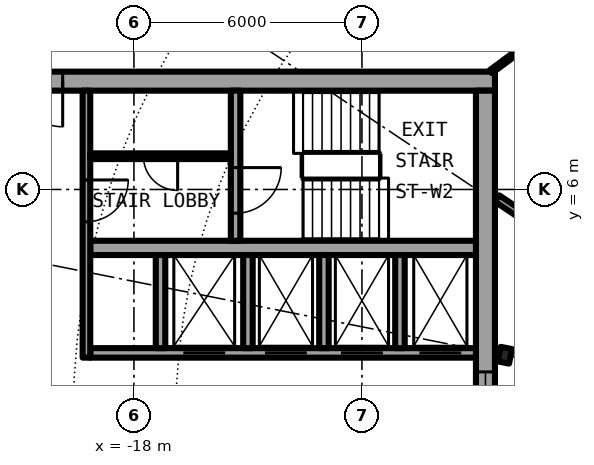
"""IFC4 building model, lengths in metres.
Left out: names, types, materials, properties, quantities, classifications, styles, units other than length and angle.
Written with IfcOpenShell. Run it as: python <this file> out.ifc"""

import sys

from ifc_helpers import new_model, si_unit, direction, frame, frame_2d, origin, origin_2d, place, context, subcontext, project, spatial, rectangle, i_section, extrude, element, fill, save


model = new_model("IFC4")
c1 = context("Model", 3, precision=1e-05, world=origin(), true_north=direction((0.0, 1.0)))
c2 = subcontext(c1, "Body", "Model", "MODEL_VIEW")
j1 = project(units=[si_unit("LENGTHUNIT", "METRE"), si_unit("PLANEANGLEUNIT", "RADIAN")], contexts=[c1])
p1 = place(None, origin())
s1 = spatial("IfcSite", under=j1, at=p1, CompositionType="ELEMENT")
p2 = place(p1, origin())
s2 = spatial("IfcBuilding", under=s1, at=p2, CompositionType="ELEMENT")
p3 = place(p2, frame((0.0, 0.0, 154.35)))
s3 = spatial("IfcBuildingStorey", under=s2, at=p3, CompositionType="ELEMENT", Elevation=154.35)
p4 = place(p3, frame((-8.239, 1.639, 0.0), z_axis=(0.0, 0.0, 1.0), x_axis=(-0.980785280403, 0.195090322016, 0.0)))
e1 = element("IfcColumn", 1, at=p4, inside=s3, PredefinedType="COLUMN", context=c2, shape_type="SweptSolid", body=[
    extrude(i_section(OverallWidth=0.3, OverallDepth=0.39, WebThickness=0.011, FlangeThickness=0.019, FilletRadius=0.027, at=origin_2d()), origin(), (0.0, 0.0, 1.0), 3.05),
])
p5 = place(p3, frame((-8.5, 8.85, 0.0), z_axis=(0.0, 0.0, 1.0), x_axis=(-1.0, 0.0, 0.0)))
e2 = element("IfcWall", 2, at=p5, inside=s3, PredefinedType="SHEAR", context=c2, shape_type="SweptSolid", body=[
    extrude(rectangle(XDim=13.6, YDim=0.5, at=frame_2d((6.8, 0.0))), origin(), (0.0, 0.0, 1.0), 3.05),
])
p6 = place(p5, frame((11.375, 0.0, 0.0)))
e3 = element("IfcOpeningElement", 3, at=p6, cuts=e2, PredefinedType="OPENING", context=c2, shape_type="SweptSolid", body=[
    extrude(rectangle(XDim=1.2, YDim=2.3, at=frame_2d((0.6, 1.15))), frame((0.0, 0.26, 0.0), z_axis=(0.0, -1.0, 0.0), x_axis=(1.0, 0.0, 0.0)), (0.0, 0.0, 1.0), 0.52),
])
p7 = place(p3, frame((-8.75, 8.6, 0.0), z_axis=(0.0, 0.0, 1.0), x_axis=(0.0, -1.0, 0.0)))
e4 = element("IfcWall", 4, at=p7, inside=s3, PredefinedType="SHEAR", context=c2, shape_type="SweptSolid", body=[
    extrude(rectangle(XDim=17.2, YDim=0.5, at=frame_2d((8.6, 0.0))), origin(), (0.0, 0.0, 1.0), 3.05),
])
p8 = place(p7, frame((7.4, 0.0, 0.1)))
e5 = element("IfcOpeningElement", 5, at=p8, cuts=e4, PredefinedType="OPENING", context=c2, shape_type="SweptSolid", body=[
    extrude(rectangle(XDim=2.4, YDim=2.2, at=frame_2d((1.2, 1.1))), frame((0.0, 0.26, 0.0), z_axis=(0.0, -1.0, 0.0), x_axis=(1.0, 0.0, 0.0)), (0.0, 0.0, 1.0), 0.52),
])
p9 = place(p3, frame((-9.0, 1.7, 0.0), z_axis=(0.0, 0.0, 1.0), x_axis=(-1.0, 0.0, 0.0)))
e6 = element("IfcWall", 6, at=p9, inside=s3, PredefinedType="SHEAR", context=c2, shape_type="SweptSolid", body=[
    extrude(rectangle(XDim=10.15, YDim=0.25, at=frame_2d((5.075, 0.0))), origin(), (0.0, 0.0, 1.0), 3.05),
])
p10 = place(p9, frame((0.387, 0.0, 0.0)))
e7 = element("IfcOpeningElement", 7, at=p10, cuts=e6, PredefinedType="OPENING", context=c2, shape_type="SweptSolid", body=[
    extrude(rectangle(XDim=1.1, YDim=2.3, at=frame_2d((0.55, 1.15))), frame((0.0, 0.135, 0.0), z_axis=(0.0, -1.0, 0.0), x_axis=(1.0, 0.0, 0.0)), (0.0, 0.0, 1.0), 0.27),
])
p11 = place(p9, frame((2.45, 0.0, 0.0)))
e8 = element("IfcOpeningElement", 8, at=p11, cuts=e6, PredefinedType="OPENING", context=c2, shape_type="SweptSolid", body=[
    extrude(rectangle(XDim=1.1, YDim=2.3, at=frame_2d((0.55, 1.15))), frame((0.0, 0.135, 0.0), z_axis=(0.0, -1.0, 0.0), x_axis=(1.0, 0.0, 0.0)), (0.0, 0.0, 1.0), 0.27),
])
p12 = place(p9, frame((4.45, 0.0, 0.0)))
e9 = element("IfcOpeningElement", 9, at=p12, cuts=e6, PredefinedType="OPENING", context=c2, shape_type="SweptSolid", body=[
    extrude(rectangle(XDim=1.1, YDim=2.3, at=frame_2d((0.55, 1.15))), frame((0.0, 0.135, 0.0), z_axis=(0.0, -1.0, 0.0), x_axis=(1.0, 0.0, 0.0)), (0.0, 0.0, 1.0), 0.27),
])
p13 = place(p9, frame((6.6, 0.0, 0.0)))
e10 = element("IfcOpeningElement", 10, at=p13, cuts=e6, PredefinedType="OPENING", context=c2, shape_type="SweptSolid", body=[
    extrude(rectangle(XDim=1.1, YDim=2.3, at=frame_2d((0.55, 1.15))), frame((0.0, 0.135, 0.0), z_axis=(0.0, -1.0, 0.0), x_axis=(1.0, 0.0, 0.0)), (0.0, 0.0, 1.0), 0.27),
])
p14 = place(p3, frame((-9.0, 4.462, 0.0), z_axis=(0.0, 0.0, 1.0), x_axis=(-1.0, 0.0, 0.0)))
e11 = element("IfcWall", 11, at=p14, inside=s3, PredefinedType="SHEAR", context=c2, shape_type="SweptSolid", body=[
    extrude(rectangle(XDim=10.15, YDim=0.375, at=frame_2d((5.075, 0.0))), origin(), (0.0, 0.0, 1.0), 3.05),
])
p15 = place(p3, frame((-15.325, 8.6, 0.0), z_axis=(0.0, 0.0, 1.0), x_axis=(0.0, -1.0, 0.0)))
e12 = element("IfcWall", 12, at=p15, inside=s3, PredefinedType="SHEAR", context=c2, shape_type="SweptSolid", body=[
    extrude(rectangle(XDim=3.95, YDim=0.25, at=frame_2d((1.975, 0.0))), origin(), (0.0, 0.0, 1.0), 3.05),
])
p16 = place(p15, frame((2.025, 0.0, 0.0)))
e13 = element("IfcOpeningElement", 13, at=p16, cuts=e12, PredefinedType="OPENING", context=c2, shape_type="SweptSolid", body=[
    extrude(rectangle(XDim=1.2, YDim=2.3, at=frame_2d((0.6, 1.15))), frame((0.0, 0.135, 0.0), z_axis=(0.0, -1.0, 0.0), x_axis=(1.0, 0.0, 0.0)), (0.0, 0.0, 1.0), 0.27),
])
for number, where, z_axis, x_axis in (
    (14, (-15.0, 1.825, 0.0), (0.0, 0.0, 1.0), (0.0, 1.0, 0.0)),
    (15, (-17.3, 1.825, 0.0), (0.0, 0.0, 1.0), (0.0, 1.0, 0.0)),
):
    element("IfcWall", number, at=place(p3, frame(where, z_axis=z_axis, x_axis=x_axis)), inside=s3, PredefinedType="SOLIDWALL", context=c2, shape_type="SweptSolid", body=[
        extrude(rectangle(XDim=2.45, YDim=0.25, at=frame_2d((1.225, 0.0))), origin(), (0.0, 0.0, 1.0), 2.7),
    ])
p17 = place(p3, frame((-19.25, 8.6, 0.0), z_axis=(0.0, 0.0, 1.0), x_axis=(0.0, -1.0, 0.0)))
e16 = element("IfcWall", 16, at=p17, inside=s3, PredefinedType="SOLIDWALL", context=c2, shape_type="SweptSolid", body=[
    extrude(rectangle(XDim=7.025, YDim=0.2, at=frame_2d((3.513, 0.0))), origin(), (0.0, 0.0, 1.0), 2.7),
])
p18 = place(p17, frame((2.35, 0.0, 0.0)))
e17 = element("IfcOpeningElement", 17, at=p18, cuts=e16, PredefinedType="OPENING", context=c2, shape_type="SweptSolid", body=[
    extrude(rectangle(XDim=1.1, YDim=2.3, at=frame_2d((0.55, 1.15))), frame((0.0, 0.11, 0.0), z_axis=(0.0, -1.0, 0.0), x_axis=(1.0, 0.0, 0.0)), (0.0, 0.0, 1.0), 0.22),
])
for number, where, z_axis, x_axis in (
    (18, (-11.0, 1.825, 0.0), (0.0, 0.0, 1.0), (0.0, 1.0, 0.0)),
    (19, (-13.0, 1.825, 0.0), (0.0, 0.0, 1.0), (0.0, 1.0, 0.0)),
):
    element("IfcWall", number, at=place(p3, frame(where, z_axis=z_axis, x_axis=x_axis)), inside=s3, PredefinedType="SOLIDWALL", context=c2, shape_type="SweptSolid", body=[
        extrude(rectangle(XDim=2.45, YDim=0.25, at=frame_2d((1.225, 0.0))), origin(), (0.0, 0.0, 1.0), 2.7),
    ])
p19 = place(p3, frame((-15.45, 6.875, 0.0), z_axis=(0.0, 0.0, 1.0), x_axis=(-1.0, 0.0, 0.0)))
e20 = element("IfcWall", 20, at=p19, inside=s3, PredefinedType="PARTITIONING", context=c2, shape_type="SweptSolid", body=[
    extrude(rectangle(XDim=3.7, YDim=0.15, at=frame_2d((1.85, 0.0))), origin(), (0.0, 0.0, 1.0), 2.7),
])
p20 = place(p19, frame((1.4, 0.0, 0.0)))
e21 = element("IfcOpeningElement", 21, at=p20, cuts=e20, PredefinedType="OPENING", context=c2, shape_type="SweptSolid", body=[
    extrude(rectangle(XDim=0.9, YDim=2.3, at=frame_2d((0.45, 1.15))), frame((0.0, 0.085, 0.0), z_axis=(0.0, -1.0, 0.0), x_axis=(1.0, 0.0, 0.0)), (0.0, 0.0, 1.0), 0.17),
])
p21 = place(p3, frame((-10.616, 12.875, 0.0), z_axis=(0.0, 0.0, 1.0), x_axis=(0.636045954217, -0.771651180342, 0.0)))
e22 = element("IfcWall", 22, at=p21, inside=s3, PredefinedType="PARTITIONING", context=c2, shape_type="SweptSolid", body=[
    extrude(rectangle(XDim=8.968, YDim=0.1, at=frame_2d((4.484, 0.0))), origin(), (0.0, 0.0, 1.0), 2.7),
])
p22 = place(p21, frame((1.667, 0.0, 0.0)))
e23 = element("IfcOpeningElement", 23, at=p22, cuts=e22, PredefinedType="OPENING", context=c2, shape_type="SweptSolid", body=[
    extrude(rectangle(XDim=0.9, YDim=2.3, at=frame_2d((0.45, 1.15))), frame((0.0, 0.06, 0.0), z_axis=(0.0, -1.0, 0.0), x_axis=(1.0, 0.0, 0.0)), (0.0, 0.0, 1.0), 0.12),
])
p23 = place(p21, frame((6.151, 0.0, 0.0)))
e24 = element("IfcOpeningElement", 24, at=p23, cuts=e22, PredefinedType="OPENING", context=c2, shape_type="SweptSolid", body=[
    extrude(rectangle(XDim=0.9, YDim=2.3, at=frame_2d((0.45, 1.15))), frame((0.0, 0.06, 0.0), z_axis=(0.0, -1.0, 0.0), x_axis=(1.0, 0.0, 0.0)), (0.0, 0.0, 1.0), 0.12),
])
p24 = place(p3, frame((-6.513, 4.472, 0.0), z_axis=(0.0, 0.0, 1.0), x_axis=(-0.83133816625, 0.555766905579, 0.0)))
e25 = element("IfcWall", 25, at=p24, inside=s3, PredefinedType="PARTITIONING", context=c2, shape_type="SweptSolid", body=[
    extrude(rectangle(XDim=2.323, YDim=0.2, at=frame_2d((1.162, 0.0))), origin(), (0.0, 0.0, 1.0), 2.7),
])
p25 = place(p3, frame((-8.607, 9.1, 0.0), z_axis=(0.0, 0.0, 1.0), x_axis=(0.803199066515, 0.595710718007, 0.0)))
e26 = element("IfcWall", 26, at=p25, inside=s3, PredefinedType="PARTITIONING", context=c2, shape_type="SweptSolid", body=[
    extrude(rectangle(XDim=0.858, YDim=0.1, at=frame_2d((0.429, 0.0))), origin(), (0.0, 0.0, 1.0), 2.7),
])
p26 = place(p10, origin())
e27 = element("IfcDoor", 27, at=p26, inside=s3, OperationType="DOUBLE_DOOR_SLIDING", PredefinedType="DOOR", context=c2, shape_type="SweptSolid", body=[
    extrude(rectangle(XDim=1.1, YDim=2.3, at=frame_2d((0.55, 1.15))), frame((0.0, 0.025, 0.0), z_axis=(0.0, -1.0, 0.0), x_axis=(1.0, 0.0, 0.0)), (0.0, 0.0, 1.0), 0.05),
])
fill(e7, e27)
p27 = place(p11, origin())
e28 = element("IfcDoor", 28, at=p27, inside=s3, OperationType="DOUBLE_DOOR_SLIDING", PredefinedType="DOOR", context=c2, shape_type="SweptSolid", body=[
    extrude(rectangle(XDim=1.1, YDim=2.3, at=frame_2d((0.55, 1.15))), frame((0.0, 0.025, 0.0), z_axis=(0.0, -1.0, 0.0), x_axis=(1.0, 0.0, 0.0)), (0.0, 0.0, 1.0), 0.05),
])
fill(e8, e28)
p28 = place(p12, origin())
e29 = element("IfcDoor", 29, at=p28, inside=s3, OperationType="DOUBLE_DOOR_SLIDING", PredefinedType="DOOR", context=c2, shape_type="SweptSolid", body=[
    extrude(rectangle(XDim=1.1, YDim=2.3, at=frame_2d((0.55, 1.15))), frame((0.0, 0.025, 0.0), z_axis=(0.0, -1.0, 0.0), x_axis=(1.0, 0.0, 0.0)), (0.0, 0.0, 1.0), 0.05),
])
fill(e9, e29)
p29 = place(p13, origin())
e30 = element("IfcDoor", 30, at=p29, inside=s3, OperationType="DOUBLE_DOOR_SLIDING", PredefinedType="DOOR", context=c2, shape_type="SweptSolid", body=[
    extrude(rectangle(XDim=1.1, YDim=2.3, at=frame_2d((0.55, 1.15))), frame((0.0, 0.025, 0.0), z_axis=(0.0, -1.0, 0.0), x_axis=(1.0, 0.0, 0.0)), (0.0, 0.0, 1.0), 0.05),
])
fill(e10, e30)
p30 = place(p20, origin())
e31 = element("IfcDoor", 31, at=p30, inside=s3, OperationType="SINGLE_SWING_LEFT", PredefinedType="DOOR", context=c2, shape_type="SweptSolid", body=[
    extrude(rectangle(XDim=0.9, YDim=2.3, at=frame_2d((0.45, 1.15))), frame((0.0, 0.025, 0.0), z_axis=(0.0, -1.0, 0.0), x_axis=(1.0, 0.0, 0.0)), (0.0, 0.0, 1.0), 0.05),
])
fill(e21, e31)
p31 = place(p16, origin())
e32 = element("IfcDoor", 32, at=p31, inside=s3, OperationType="SINGLE_SWING_LEFT", PredefinedType="DOOR", context=c2, shape_type="SweptSolid", body=[
    extrude(rectangle(XDim=1.2, YDim=2.3, at=frame_2d((0.6, 1.15))), frame((0.0, 0.025, 0.0), z_axis=(0.0, -1.0, 0.0), x_axis=(1.0, 0.0, 0.0)), (0.0, 0.0, 1.0), 0.05),
])
fill(e13, e32)
p32 = place(p18, origin())
e33 = element("IfcDoor", 33, at=p32, inside=s3, OperationType="SINGLE_SWING_RIGHT", PredefinedType="DOOR", context=c2, shape_type="SweptSolid", body=[
    extrude(rectangle(XDim=1.1, YDim=2.3, at=frame_2d((0.55, 1.15))), frame((0.0, 0.025, 0.0), z_axis=(0.0, -1.0, 0.0), x_axis=(1.0, 0.0, 0.0)), (0.0, 0.0, 1.0), 0.05),
])
fill(e17, e33)
p33 = place(p6, origin())
e34 = element("IfcDoor", 34, at=p33, inside=s3, OperationType="SINGLE_SWING_LEFT", PredefinedType="DOOR", context=c2, shape_type="SweptSolid", body=[
    extrude(rectangle(XDim=1.2, YDim=2.3, at=frame_2d((0.6, 1.15))), frame((0.0, 0.025, 0.0), z_axis=(0.0, -1.0, 0.0), x_axis=(1.0, 0.0, 0.0)), (0.0, 0.0, 1.0), 0.05),
])
fill(e3, e34)
p34 = place(p8, origin())
e35 = element("IfcWindow", 35, at=p34, inside=s3, PartitioningType="SINGLE_PANEL", PredefinedType="WINDOW", context=c2, shape_type="SweptSolid", body=[
    extrude(rectangle(XDim=2.4, YDim=2.2, at=frame_2d((1.2, 1.1))), frame((0.0, 0.03, 0.0), z_axis=(0.0, -1.0, 0.0), x_axis=(1.0, 0.0, 0.0)), (0.0, 0.0, 1.0), 0.06),
])
fill(e5, e35)
save(model, sys.argv[1])
